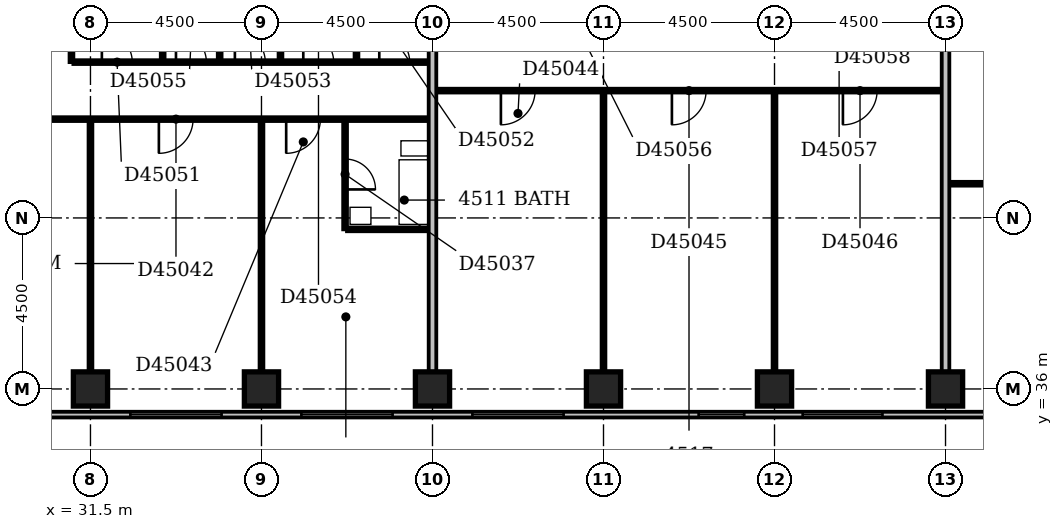
"""IFC4 building model, lengths in metres.
Left out: names, types, materials, properties, quantities, classifications, styles, units other than length and angle.
Written with IfcOpenShell. Run it as: python <this file> out.ifc"""

import sys

from ifc_helpers import new_model, si_unit, direction, frame, frame_2d, origin, origin_2d, place, context, subcontext, project, spatial, rectangle, extrude, element, fill, save


model = new_model("IFC4")
c1 = context("Model", 3, precision=1e-05, world=origin(), true_north=direction((0.0, 1.0)))
c2 = subcontext(c1, "Body", "Model", "MODEL_VIEW")
j1 = project(units=[si_unit("LENGTHUNIT", "METRE"), si_unit("PLANEANGLEUNIT", "RADIAN")], contexts=[c1])
p1 = place(None, origin())
s1 = spatial("IfcSite", under=j1, at=p1, CompositionType="ELEMENT")
p2 = place(p1, origin())
s2 = spatial("IfcBuilding", under=s1, at=p2, CompositionType="ELEMENT")
p3 = place(p2, frame((0.0, 0.0, 179.0)))
s3 = spatial("IfcBuildingStorey", under=s2, at=p3, CompositionType="ELEMENT", Elevation=179.0)
for number, where, z_axis, x_axis in (
    (1, (31.5, 36.0, -0.3), (0.0, 0.0, 1.0), (1.0, 0.0, 0.0)),
    (2, (36.0, 36.0, -0.3), (0.0, 0.0, 1.0), (1.0, 0.0, 0.0)),
    (3, (40.5, 36.0, -0.3), (0.0, 0.0, 1.0), (1.0, 0.0, 0.0)),
    (4, (45.0, 36.0, -0.3), (0.0, 0.0, 1.0), (1.0, 0.0, 0.0)),
    (5, (49.5, 36.0, -0.3), (0.0, 0.0, 1.0), (1.0, 0.0, 0.0)),
    (6, (54.0, 36.0, -0.3), (0.0, 0.0, 1.0), (1.0, 0.0, 0.0)),
):
    element("IfcColumn", number, at=place(p3, frame(where, z_axis=z_axis, x_axis=x_axis)), inside=s3, PredefinedType="COLUMN", context=c2, shape_type="SweptSolid", body=[
        extrude(rectangle(XDim=0.9, YDim=0.9, at=origin_2d()), origin(), (0.0, 0.0, 1.0), 3.6),
    ])
p4 = place(p3, frame((23.1, 35.325, 0.0), z_axis=(0.0, 0.0, 1.0), x_axis=(1.0, 0.0, 0.0)))
e7 = element("IfcWall", 7, at=p4, inside=s3, PredefinedType="STANDARD", context=c2, shape_type="SweptSolid", body=[
    extrude(rectangle(XDim=45.15, YDim=0.15, at=frame_2d((22.575, 0.0))), origin(), (0.0, 0.0, 1.0), 2.7),
])
p5 = place(p4, frame((0.217, 0.0, 0.6)))
e8 = element("IfcOpeningElement", 8, at=p5, cuts=e7, PredefinedType="OPENING", context=c2, shape_type="SweptSolid", body=[
    extrude(rectangle(XDim=2.1, YDim=1.8, at=frame_2d((1.05, 0.9))), frame((0.0, 0.087, 0.0), z_axis=(0.0, -1.0, 0.0), x_axis=(1.0, 0.0, 0.0)), (0.0, 0.0, 1.0), 0.174),
])
p6 = place(p4, frame((4.95, 0.0, 0.6)))
e9 = element("IfcOpeningElement", 9, at=p6, cuts=e7, PredefinedType="OPENING", context=c2, shape_type="SweptSolid", body=[
    extrude(rectangle(XDim=2.4, YDim=1.8, at=frame_2d((1.2, 0.9))), frame((0.0, 0.087, 0.0), z_axis=(0.0, -1.0, 0.0), x_axis=(1.0, 0.0, 0.0)), (0.0, 0.0, 1.0), 0.174),
])
p7 = place(p4, frame((9.45, 0.0, 0.6)))
e10 = element("IfcOpeningElement", 10, at=p7, cuts=e7, PredefinedType="OPENING", context=c2, shape_type="SweptSolid", body=[
    extrude(rectangle(XDim=2.4, YDim=1.8, at=frame_2d((1.2, 0.9))), frame((0.0, 0.087, 0.0), z_axis=(0.0, -1.0, 0.0), x_axis=(1.0, 0.0, 0.0)), (0.0, 0.0, 1.0), 0.174),
])
p8 = place(p4, frame((13.95, 0.0, 0.6)))
e11 = element("IfcOpeningElement", 11, at=p8, cuts=e7, PredefinedType="OPENING", context=c2, shape_type="SweptSolid", body=[
    extrude(rectangle(XDim=2.4, YDim=1.8, at=frame_2d((1.2, 0.9))), frame((0.0, 0.087, 0.0), z_axis=(0.0, -1.0, 0.0), x_axis=(1.0, 0.0, 0.0)), (0.0, 0.0, 1.0), 0.174),
])
p9 = place(p4, frame((18.45, 0.0, 0.6)))
e12 = element("IfcOpeningElement", 12, at=p9, cuts=e7, PredefinedType="OPENING", context=c2, shape_type="SweptSolid", body=[
    extrude(rectangle(XDim=2.4, YDim=1.8, at=frame_2d((1.2, 0.9))), frame((0.0, 0.087, 0.0), z_axis=(0.0, -1.0, 0.0), x_axis=(1.0, 0.0, 0.0)), (0.0, 0.0, 1.0), 0.174),
])
p10 = place(p4, frame((24.403, 0.0, 0.6)))
e13 = element("IfcOpeningElement", 13, at=p10, cuts=e7, PredefinedType="OPENING", context=c2, shape_type="SweptSolid", body=[
    extrude(rectangle(XDim=1.2, YDim=1.8, at=frame_2d((0.6, 0.9))), frame((0.0, 0.087, 0.0), z_axis=(0.0, -1.0, 0.0), x_axis=(1.0, 0.0, 0.0)), (0.0, 0.0, 1.0), 0.174),
])
p11 = place(p4, frame((27.141, 0.0, 0.6)))
e14 = element("IfcOpeningElement", 14, at=p11, cuts=e7, PredefinedType="OPENING", context=c2, shape_type="SweptSolid", body=[
    extrude(rectangle(XDim=2.1, YDim=1.8, at=frame_2d((1.05, 0.9))), frame((0.0, 0.087, 0.0), z_axis=(0.0, -1.0, 0.0), x_axis=(1.0, 0.0, 0.0)), (0.0, 0.0, 1.0), 0.174),
])
p12 = place(p4, frame((31.95, 0.0, 0.6)))
e15 = element("IfcOpeningElement", 15, at=p12, cuts=e7, PredefinedType="OPENING", context=c2, shape_type="SweptSolid", body=[
    extrude(rectangle(XDim=2.4, YDim=1.8, at=frame_2d((1.2, 0.9))), frame((0.0, 0.087, 0.0), z_axis=(0.0, -1.0, 0.0), x_axis=(1.0, 0.0, 0.0)), (0.0, 0.0, 1.0), 0.174),
])
p13 = place(p4, frame((36.45, 0.0, 0.6)))
e16 = element("IfcOpeningElement", 16, at=p13, cuts=e7, PredefinedType="OPENING", context=c2, shape_type="SweptSolid", body=[
    extrude(rectangle(XDim=2.4, YDim=1.8, at=frame_2d((1.2, 0.9))), frame((0.0, 0.087, 0.0), z_axis=(0.0, -1.0, 0.0), x_axis=(1.0, 0.0, 0.0)), (0.0, 0.0, 1.0), 0.174),
])
p14 = place(p4, frame((40.95, 0.0, 0.6)))
e17 = element("IfcOpeningElement", 17, at=p14, cuts=e7, PredefinedType="OPENING", context=c2, shape_type="SweptSolid", body=[
    extrude(rectangle(XDim=2.4, YDim=1.8, at=frame_2d((1.2, 0.9))), frame((0.0, 0.087, 0.0), z_axis=(0.0, -1.0, 0.0), x_axis=(1.0, 0.0, 0.0)), (0.0, 0.0, 1.0), 0.174),
])
p15 = place(p3, frame((31.5, 36.45, 0.0), z_axis=(0.0, 0.0, 1.0), x_axis=(0.0, 1.0, 0.0)))
e18 = element("IfcWall", 18, at=p15, inside=s3, PredefinedType="PARTITIONING", context=c2, shape_type="SweptSolid", body=[
    extrude(rectangle(XDim=6.6, YDim=0.1, at=frame_2d((3.3, 0.0))), origin(), (0.0, 0.0, 1.0), 3.3),
])
p16 = place(p3, frame((36.0, 36.45, 0.0), z_axis=(0.0, 0.0, 1.0), x_axis=(0.0, 1.0, 0.0)))
e19 = element("IfcWall", 19, at=p16, inside=s3, PredefinedType="PARTITIONING", context=c2, shape_type="SweptSolid", body=[
    extrude(rectangle(XDim=6.6, YDim=0.1, at=frame_2d((3.3, 0.0))), origin(), (0.0, 0.0, 1.0), 2.4),
])
p17 = place(p3, frame((40.5, 36.45, 0.0), z_axis=(0.0, 0.0, 1.0), x_axis=(0.0, 1.0, 0.0)))
e20 = element("IfcWall", 20, at=p17, inside=s3, PredefinedType="PARTITIONING", context=c2, shape_type="SweptSolid", body=[
    extrude(rectangle(XDim=12.95, YDim=0.2, at=frame_2d((6.475, 0.0))), origin(), (0.0, 0.0, 1.0), 3.3),
])
p18 = place(p3, frame((45.0, 36.45, 0.0), z_axis=(0.0, 0.0, 1.0), x_axis=(0.0, 1.0, 0.0)))
e21 = element("IfcWall", 21, at=p18, inside=s3, PredefinedType="PARTITIONING", context=c2, shape_type="SweptSolid", body=[
    extrude(rectangle(XDim=7.35, YDim=0.1, at=frame_2d((3.675, 0.0))), origin(), (0.0, 0.0, 1.0), 2.6),
])
p19 = place(p3, frame((49.5, 36.45, 0.0), z_axis=(0.0, 0.0, 1.0), x_axis=(0.0, 1.0, 0.0)))
e22 = element("IfcWall", 22, at=p19, inside=s3, PredefinedType="PARTITIONING", context=c2, shape_type="SweptSolid", body=[
    extrude(rectangle(XDim=7.35, YDim=0.1, at=frame_2d((3.675, 0.0))), origin(), (0.0, 0.0, 1.0), 3.3),
])
p20 = place(p3, frame((54.0, 36.45, 0.0), z_axis=(0.0, 0.0, 1.0), x_axis=(0.0, 1.0, 0.0)))
e23 = element("IfcWall", 23, at=p20, inside=s3, PredefinedType="PARTITIONING", context=c2, shape_type="SweptSolid", body=[
    extrude(rectangle(XDim=12.95, YDim=0.2, at=frame_2d((6.475, 0.0))), origin(), (0.0, 0.0, 1.0), 2.6),
])
p21 = place(p3, frame((38.2, 40.2, 0.0), z_axis=(0.0, 0.0, 1.0), x_axis=(0.0, 1.0, 0.0)))
e24 = element("IfcWall", 24, at=p21, inside=s3, PredefinedType="PLUMBINGWALL", context=c2, shape_type="SweptSolid", body=[
    extrude(rectangle(XDim=2.85, YDim=0.1, at=frame_2d((1.425, 0.0))), origin(), (0.0, 0.0, 1.0), 3.3),
])
p22 = place(p21, frame((1.05, 0.0, 0.0)))
e25 = element("IfcOpeningElement", 25, at=p22, cuts=e24, PredefinedType="OPENING", context=c2, shape_type="SweptSolid", body=[
    extrude(rectangle(XDim=0.8, YDim=2.1, at=frame_2d((0.4, 1.05))), frame((0.0, 0.062, 0.0), z_axis=(0.0, -1.0, 0.0), x_axis=(1.0, 0.0, 0.0)), (0.0, 0.0, 1.0), 0.124),
])
p23 = place(p3, frame((38.25, 40.2, 0.0), z_axis=(0.0, 0.0, 1.0), x_axis=(1.0, 0.0, 0.0)))
e26 = element("IfcWall", 26, at=p23, inside=s3, PredefinedType="PLUMBINGWALL", context=c2, shape_type="SweptSolid", body=[
    extrude(rectangle(XDim=2.15, YDim=0.1, at=frame_2d((1.075, 0.0))), origin(), (0.0, 0.0, 1.0), 3.3),
])
p24 = place(p3, frame((54.1, 41.4, 0.0), z_axis=(0.0, 0.0, 1.0), x_axis=(1.0, 0.0, 0.0)))
e27 = element("IfcWall", 27, at=p24, inside=s3, PredefinedType="PARTITIONING", context=c2, shape_type="SweptSolid", body=[
    extrude(rectangle(XDim=14.0, YDim=0.1, at=frame_2d((7.0, 0.0))), origin(), (0.0, 0.0, 1.0), 3.3),
])
p25 = place(p24, frame((1.7, 0.0, 0.0)))
e28 = element("IfcOpeningElement", 28, at=p25, cuts=e27, PredefinedType="OPENING", context=c2, shape_type="SweptSolid", body=[
    extrude(rectangle(XDim=0.9, YDim=2.1, at=frame_2d((0.45, 1.05))), frame((0.0, 0.062, 0.0), z_axis=(0.0, -1.0, 0.0), x_axis=(1.0, 0.0, 0.0)), (0.0, 0.0, 1.0), 0.124),
])
p26 = place(p24, frame((6.2, 0.0, 0.0)))
e29 = element("IfcOpeningElement", 29, at=p26, cuts=e27, PredefinedType="OPENING", context=c2, shape_type="SweptSolid", body=[
    extrude(rectangle(XDim=0.9, YDim=2.1, at=frame_2d((0.45, 1.05))), frame((0.0, 0.062, 0.0), z_axis=(0.0, -1.0, 0.0), x_axis=(1.0, 0.0, 0.0)), (0.0, 0.0, 1.0), 0.124),
])
p27 = place(p24, frame((10.7, 0.0, 0.0)))
e30 = element("IfcOpeningElement", 30, at=p27, cuts=e27, PredefinedType="OPENING", context=c2, shape_type="SweptSolid", body=[
    extrude(rectangle(XDim=0.9, YDim=2.1, at=frame_2d((0.45, 1.05))), frame((0.0, 0.062, 0.0), z_axis=(0.0, -1.0, 0.0), x_axis=(1.0, 0.0, 0.0)), (0.0, 0.0, 1.0), 0.124),
])
p28 = place(p3, frame((22.6, 43.1, 0.0), z_axis=(0.0, 0.0, 1.0), x_axis=(1.0, 0.0, 0.0)))
e31 = element("IfcWall", 31, at=p28, inside=s3, PredefinedType="PARTITIONING", context=c2, shape_type="SweptSolid", body=[
    extrude(rectangle(XDim=17.8, YDim=0.1, at=frame_2d((8.9, 0.0))), origin(), (0.0, 0.0, 1.0), 3.3),
])
p29 = place(p28, frame((3.9, 0.0, 0.0)))
e32 = element("IfcOpeningElement", 32, at=p29, cuts=e31, PredefinedType="OPENING", context=c2, shape_type="SweptSolid", body=[
    extrude(rectangle(XDim=0.9, YDim=2.1, at=frame_2d((0.45, 1.05))), frame((0.0, 0.062, 0.0), z_axis=(0.0, -1.0, 0.0), x_axis=(1.0, 0.0, 0.0)), (0.0, 0.0, 1.0), 0.124),
])
p30 = place(p28, frame((10.7, 0.0, 0.0)))
e33 = element("IfcOpeningElement", 33, at=p30, cuts=e31, PredefinedType="OPENING", context=c2, shape_type="SweptSolid", body=[
    extrude(rectangle(XDim=0.9, YDim=2.1, at=frame_2d((0.45, 1.05))), frame((0.0, 0.062, 0.0), z_axis=(0.0, -1.0, 0.0), x_axis=(1.0, 0.0, 0.0)), (0.0, 0.0, 1.0), 0.124),
])
p31 = place(p28, frame((14.05, 0.0, 0.0)))
e34 = element("IfcOpeningElement", 34, at=p31, cuts=e31, PredefinedType="OPENING", context=c2, shape_type="SweptSolid", body=[
    extrude(rectangle(XDim=0.9, YDim=2.1, at=frame_2d((0.45, 1.05))), frame((0.0, 0.062, 0.0), z_axis=(0.0, -1.0, 0.0), x_axis=(1.0, 0.0, 0.0)), (0.0, 0.0, 1.0), 0.124),
])
p32 = place(p3, frame((40.6, 43.85, 0.0), z_axis=(0.0, 0.0, 1.0), x_axis=(1.0, 0.0, 0.0)))
e35 = element("IfcWall", 35, at=p32, inside=s3, PredefinedType="PARTITIONING", context=c2, shape_type="SweptSolid", body=[
    extrude(rectangle(XDim=13.3, YDim=0.1, at=frame_2d((6.65, 0.0))), origin(), (0.0, 0.0, 1.0), 3.3),
])
p33 = place(p32, frame((1.7, 0.0, 0.0)))
e36 = element("IfcOpeningElement", 36, at=p33, cuts=e35, PredefinedType="OPENING", context=c2, shape_type="SweptSolid", body=[
    extrude(rectangle(XDim=0.9, YDim=2.1, at=frame_2d((0.45, 1.05))), frame((0.0, 0.062, 0.0), z_axis=(0.0, -1.0, 0.0), x_axis=(1.0, 0.0, 0.0)), (0.0, 0.0, 1.0), 0.124),
])
p34 = place(p32, frame((6.2, 0.0, 0.0)))
e37 = element("IfcOpeningElement", 37, at=p34, cuts=e35, PredefinedType="OPENING", context=c2, shape_type="SweptSolid", body=[
    extrude(rectangle(XDim=0.9, YDim=2.1, at=frame_2d((0.45, 1.05))), frame((0.0, 0.062, 0.0), z_axis=(0.0, -1.0, 0.0), x_axis=(1.0, 0.0, 0.0)), (0.0, 0.0, 1.0), 0.124),
])
p35 = place(p32, frame((10.7, 0.0, 0.0)))
e38 = element("IfcOpeningElement", 38, at=p35, cuts=e35, PredefinedType="OPENING", context=c2, shape_type="SweptSolid", body=[
    extrude(rectangle(XDim=0.9, YDim=2.1, at=frame_2d((0.45, 1.05))), frame((0.0, 0.062, 0.0), z_axis=(0.0, -1.0, 0.0), x_axis=(1.0, 0.0, 0.0)), (0.0, 0.0, 1.0), 0.124),
])
p36 = place(p3, frame((31.0, 44.6, 0.0), z_axis=(0.0, 0.0, 1.0), x_axis=(0.0, 1.0, 0.0)))
e39 = element("IfcWall", 39, at=p36, inside=s3, PredefinedType="PLUMBINGWALL", context=c2, shape_type="SweptSolid", body=[
    extrude(rectangle(XDim=4.8, YDim=0.1, at=frame_2d((2.4, 0.0))), origin(), (0.0, 0.0, 1.0), 3.3),
])
p37 = place(p3, frame((31.05, 44.6, 0.0), z_axis=(0.0, 0.0, 1.0), x_axis=(1.0, 0.0, 0.0)))
e40 = element("IfcWall", 40, at=p37, inside=s3, PredefinedType="PARTITIONING", context=c2, shape_type="SweptSolid", body=[
    extrude(rectangle(XDim=9.35, YDim=0.1, at=frame_2d((4.675, 0.0))), origin(), (0.0, 0.0, 1.0), 3.3),
])
p38 = place(p37, frame((0.75, 0.0, 0.0)))
e41 = element("IfcOpeningElement", 41, at=p38, cuts=e40, PredefinedType="OPENING", context=c2, shape_type="SweptSolid", body=[
    extrude(rectangle(XDim=0.8, YDim=2.1, at=frame_2d((0.4, 1.05))), frame((0.0, 0.062, 0.0), z_axis=(0.0, -1.0, 0.0), x_axis=(1.0, 0.0, 0.0)), (0.0, 0.0, 1.0), 0.124),
])
p39 = place(p37, frame((8.05, 0.0, 0.0)))
e42 = element("IfcOpeningElement", 42, at=p39, cuts=e40, PredefinedType="OPENING", context=c2, shape_type="SweptSolid", body=[
    extrude(rectangle(XDim=0.8, YDim=2.1, at=frame_2d((0.4, 1.05))), frame((0.0, 0.062, 0.0), z_axis=(0.0, -1.0, 0.0), x_axis=(1.0, 0.0, 0.0)), (0.0, 0.0, 1.0), 0.124),
])
p40 = place(p37, frame((4.25, 0.0, 0.0)))
e43 = element("IfcOpeningElement", 43, at=p40, cuts=e40, PredefinedType="OPENING", context=c2, shape_type="SweptSolid", body=[
    extrude(rectangle(XDim=0.8, YDim=2.1, at=frame_2d((0.4, 1.05))), frame((0.0, 0.062, 0.0), z_axis=(0.0, -1.0, 0.0), x_axis=(1.0, 0.0, 0.0)), (0.0, 0.0, 1.0), 0.124),
])
p41 = place(p37, frame((6.05, 0.0, 0.0)))
e44 = element("IfcOpeningElement", 44, at=p41, cuts=e40, PredefinedType="OPENING", context=c2, shape_type="SweptSolid", body=[
    extrude(rectangle(XDim=0.8, YDim=2.1, at=frame_2d((0.4, 1.05))), frame((0.0, 0.062, 0.0), z_axis=(0.0, -1.0, 0.0), x_axis=(1.0, 0.0, 0.0)), (0.0, 0.0, 1.0), 0.124),
])
p42 = place(p37, frame((2.7, 0.0, 0.0)))
e45 = element("IfcOpeningElement", 45, at=p42, cuts=e40, PredefinedType="OPENING", context=c2, shape_type="SweptSolid", body=[
    extrude(rectangle(XDim=0.8, YDim=2.1, at=frame_2d((0.4, 1.05))), frame((0.0, 0.062, 0.0), z_axis=(0.0, -1.0, 0.0), x_axis=(1.0, 0.0, 0.0)), (0.0, 0.0, 1.0), 0.124),
])
for number, where, z_axis, x_axis in (
    (46, (33.4, 44.65, 0.0), (0.0, 0.0, 1.0), (0.0, 1.0, 0.0)),
    (47, (34.9, 44.65, 0.0), (0.0, 0.0, 1.0), (0.0, 1.0, 0.0)),
):
    element("IfcWall", number, at=place(p3, frame(where, z_axis=z_axis, x_axis=x_axis)), inside=s3, PredefinedType="PLUMBINGWALL", context=c2, shape_type="SweptSolid", body=[
        extrude(rectangle(XDim=4.75, YDim=0.1, at=frame_2d((2.375, 0.0))), origin(), (0.0, 0.0, 1.0), 3.3),
    ])
p43 = place(p3, frame((36.5, 44.65, 0.0), z_axis=(0.0, 0.0, 1.0), x_axis=(0.0, 1.0, 0.0)))
e48 = element("IfcWall", 48, at=p43, inside=s3, PredefinedType="PARTITIONING", context=c2, shape_type="SweptSolid", body=[
    extrude(rectangle(XDim=4.75, YDim=0.1, at=frame_2d((2.375, 0.0))), origin(), (0.0, 0.0, 1.0), 2.4),
])
p44 = place(p3, frame((38.5, 44.65, 0.0), z_axis=(0.0, 0.0, 1.0), x_axis=(0.0, 1.0, 0.0)))
e49 = element("IfcWall", 49, at=p44, inside=s3, PredefinedType="PARTITIONING", context=c2, shape_type="SweptSolid", body=[
    extrude(rectangle(XDim=4.75, YDim=0.1, at=frame_2d((2.375, 0.0))), origin(), (0.0, 0.0, 1.0), 3.3),
])
p45 = place(p7, origin())
e50 = element("IfcWindow", 50, at=p45, inside=s3, PartitioningType="SINGLE_PANEL", PredefinedType="WINDOW", context=c2, shape_type="SweptSolid", body=[
    extrude(rectangle(XDim=2.4, YDim=1.8, at=frame_2d((1.2, 0.9))), frame((0.0, 0.03, 0.0), z_axis=(0.0, -1.0, 0.0), x_axis=(1.0, 0.0, 0.0)), (0.0, 0.0, 1.0), 0.06),
])
fill(e10, e50)
p46 = place(p8, origin())
e51 = element("IfcWindow", 51, at=p46, inside=s3, PartitioningType="SINGLE_PANEL", PredefinedType="WINDOW", context=c2, shape_type="SweptSolid", body=[
    extrude(rectangle(XDim=2.4, YDim=1.8, at=frame_2d((1.2, 0.9))), frame((0.0, 0.03, 0.0), z_axis=(0.0, -1.0, 0.0), x_axis=(1.0, 0.0, 0.0)), (0.0, 0.0, 1.0), 0.06),
])
fill(e11, e51)
p47 = place(p9, origin())
e52 = element("IfcWindow", 52, at=p47, inside=s3, PartitioningType="SINGLE_PANEL", PredefinedType="WINDOW", context=c2, shape_type="SweptSolid", body=[
    extrude(rectangle(XDim=2.4, YDim=1.8, at=frame_2d((1.2, 0.9))), frame((0.0, 0.03, 0.0), z_axis=(0.0, -1.0, 0.0), x_axis=(1.0, 0.0, 0.0)), (0.0, 0.0, 1.0), 0.06),
])
fill(e12, e52)
p48 = place(p10, origin())
e53 = element("IfcWindow", 53, at=p48, inside=s3, PartitioningType="SINGLE_PANEL", PredefinedType="WINDOW", context=c2, shape_type="SweptSolid", body=[
    extrude(rectangle(XDim=1.2, YDim=1.8, at=frame_2d((0.6, 0.9))), frame((0.0, 0.03, 0.0), z_axis=(0.0, -1.0, 0.0), x_axis=(1.0, 0.0, 0.0)), (0.0, 0.0, 1.0), 0.06),
])
fill(e13, e53)
p49 = place(p11, origin())
e54 = element("IfcWindow", 54, at=p49, inside=s3, PartitioningType="SINGLE_PANEL", PredefinedType="WINDOW", context=c2, shape_type="SweptSolid", body=[
    extrude(rectangle(XDim=2.1, YDim=1.8, at=frame_2d((1.05, 0.9))), frame((0.0, 0.03, 0.0), z_axis=(0.0, -1.0, 0.0), x_axis=(1.0, 0.0, 0.0)), (0.0, 0.0, 1.0), 0.06),
])
fill(e14, e54)
p50 = place(p22, frame((0.8, 0.0, 0.0), z_axis=(0.0, 0.0, 1.0), x_axis=(-1.0, 0.0, 0.0)))
e55 = element("IfcDoor", 55, at=p50, inside=s3, OperationType="SINGLE_SWING_RIGHT", PredefinedType="DOOR", context=c2, shape_type="SweptSolid", body=[
    extrude(rectangle(XDim=0.8, YDim=2.1, at=frame_2d((0.4, 1.05))), frame((0.0, 0.025, 0.0), z_axis=(0.0, -1.0, 0.0), x_axis=(1.0, 0.0, 0.0)), (0.0, 0.0, 1.0), 0.05),
])
fill(e25, e55)
p51 = place(p30, frame((0.9, 0.0, 0.0), z_axis=(0.0, 0.0, 1.0), x_axis=(-1.0, 0.0, 0.0)))
e56 = element("IfcDoor", 56, at=p51, inside=s3, OperationType="SINGLE_SWING_RIGHT", PredefinedType="DOOR", context=c2, shape_type="SweptSolid", body=[
    extrude(rectangle(XDim=0.9, YDim=2.1, at=frame_2d((0.45, 1.05))), frame((0.0, 0.025, 0.0), z_axis=(0.0, -1.0, 0.0), x_axis=(1.0, 0.0, 0.0)), (0.0, 0.0, 1.0), 0.05),
])
fill(e33, e56)
p52 = place(p31, frame((0.9, 0.0, 0.0), z_axis=(0.0, 0.0, 1.0), x_axis=(-1.0, 0.0, 0.0)))
e57 = element("IfcDoor", 57, at=p52, inside=s3, OperationType="SINGLE_SWING_RIGHT", PredefinedType="DOOR", context=c2, shape_type="SweptSolid", body=[
    extrude(rectangle(XDim=0.9, YDim=2.1, at=frame_2d((0.45, 1.05))), frame((0.0, 0.025, 0.0), z_axis=(0.0, -1.0, 0.0), x_axis=(1.0, 0.0, 0.0)), (0.0, 0.0, 1.0), 0.05),
])
fill(e34, e57)
p53 = place(p33, frame((0.9, 0.0, 0.0), z_axis=(0.0, 0.0, 1.0), x_axis=(-1.0, 0.0, 0.0)))
e58 = element("IfcDoor", 58, at=p53, inside=s3, OperationType="SINGLE_SWING_RIGHT", PredefinedType="DOOR", context=c2, shape_type="SweptSolid", body=[
    extrude(rectangle(XDim=0.9, YDim=2.1, at=frame_2d((0.45, 1.05))), frame((0.0, 0.025, 0.0), z_axis=(0.0, -1.0, 0.0), x_axis=(1.0, 0.0, 0.0)), (0.0, 0.0, 1.0), 0.05),
])
fill(e36, e58)
p54 = place(p34, frame((0.9, 0.0, 0.0), z_axis=(0.0, 0.0, 1.0), x_axis=(-1.0, 0.0, 0.0)))
e59 = element("IfcDoor", 59, at=p54, inside=s3, OperationType="SINGLE_SWING_RIGHT", PredefinedType="DOOR", context=c2, shape_type="SweptSolid", body=[
    extrude(rectangle(XDim=0.9, YDim=2.1, at=frame_2d((0.45, 1.05))), frame((0.0, 0.025, 0.0), z_axis=(0.0, -1.0, 0.0), x_axis=(1.0, 0.0, 0.0)), (0.0, 0.0, 1.0), 0.05),
])
fill(e37, e59)
p55 = place(p35, frame((0.9, 0.0, 0.0), z_axis=(0.0, 0.0, 1.0), x_axis=(-1.0, 0.0, 0.0)))
e60 = element("IfcDoor", 60, at=p55, inside=s3, OperationType="SINGLE_SWING_RIGHT", PredefinedType="DOOR", context=c2, shape_type="SweptSolid", body=[
    extrude(rectangle(XDim=0.9, YDim=2.1, at=frame_2d((0.45, 1.05))), frame((0.0, 0.025, 0.0), z_axis=(0.0, -1.0, 0.0), x_axis=(1.0, 0.0, 0.0)), (0.0, 0.0, 1.0), 0.05),
])
fill(e38, e60)
p56 = place(p38, origin())
e61 = element("IfcDoor", 61, at=p56, inside=s3, OperationType="SINGLE_SWING_LEFT", PredefinedType="DOOR", context=c2, shape_type="SweptSolid", body=[
    extrude(rectangle(XDim=0.8, YDim=2.1, at=frame_2d((0.4, 1.05))), frame((0.0, 0.025, 0.0), z_axis=(0.0, -1.0, 0.0), x_axis=(1.0, 0.0, 0.0)), (0.0, 0.0, 1.0), 0.05),
])
fill(e41, e61)
p57 = place(p39, origin())
e62 = element("IfcDoor", 62, at=p57, inside=s3, OperationType="SINGLE_SWING_LEFT", PredefinedType="DOOR", context=c2, shape_type="SweptSolid", body=[
    extrude(rectangle(XDim=0.8, YDim=2.1, at=frame_2d((0.4, 1.05))), frame((0.0, 0.025, 0.0), z_axis=(0.0, -1.0, 0.0), x_axis=(1.0, 0.0, 0.0)), (0.0, 0.0, 1.0), 0.05),
])
fill(e42, e62)
p58 = place(p40, origin())
e63 = element("IfcDoor", 63, at=p58, inside=s3, OperationType="SINGLE_SWING_LEFT", PredefinedType="DOOR", context=c2, shape_type="SweptSolid", body=[
    extrude(rectangle(XDim=0.8, YDim=2.1, at=frame_2d((0.4, 1.05))), frame((0.0, 0.025, 0.0), z_axis=(0.0, -1.0, 0.0), x_axis=(1.0, 0.0, 0.0)), (0.0, 0.0, 1.0), 0.05),
])
fill(e43, e63)
p59 = place(p41, origin())
e64 = element("IfcDoor", 64, at=p59, inside=s3, OperationType="SINGLE_SWING_LEFT", PredefinedType="DOOR", context=c2, shape_type="SweptSolid", body=[
    extrude(rectangle(XDim=0.8, YDim=2.1, at=frame_2d((0.4, 1.05))), frame((0.0, 0.025, 0.0), z_axis=(0.0, -1.0, 0.0), x_axis=(1.0, 0.0, 0.0)), (0.0, 0.0, 1.0), 0.05),
])
fill(e44, e64)
p60 = place(p42, origin())
e65 = element("IfcDoor", 65, at=p60, inside=s3, OperationType="SINGLE_SWING_LEFT", PredefinedType="DOOR", context=c2, shape_type="SweptSolid", body=[
    extrude(rectangle(XDim=0.8, YDim=2.1, at=frame_2d((0.4, 1.05))), frame((0.0, 0.025, 0.0), z_axis=(0.0, -1.0, 0.0), x_axis=(1.0, 0.0, 0.0)), (0.0, 0.0, 1.0), 0.05),
])
fill(e45, e65)
save(model, sys.argv[1])
